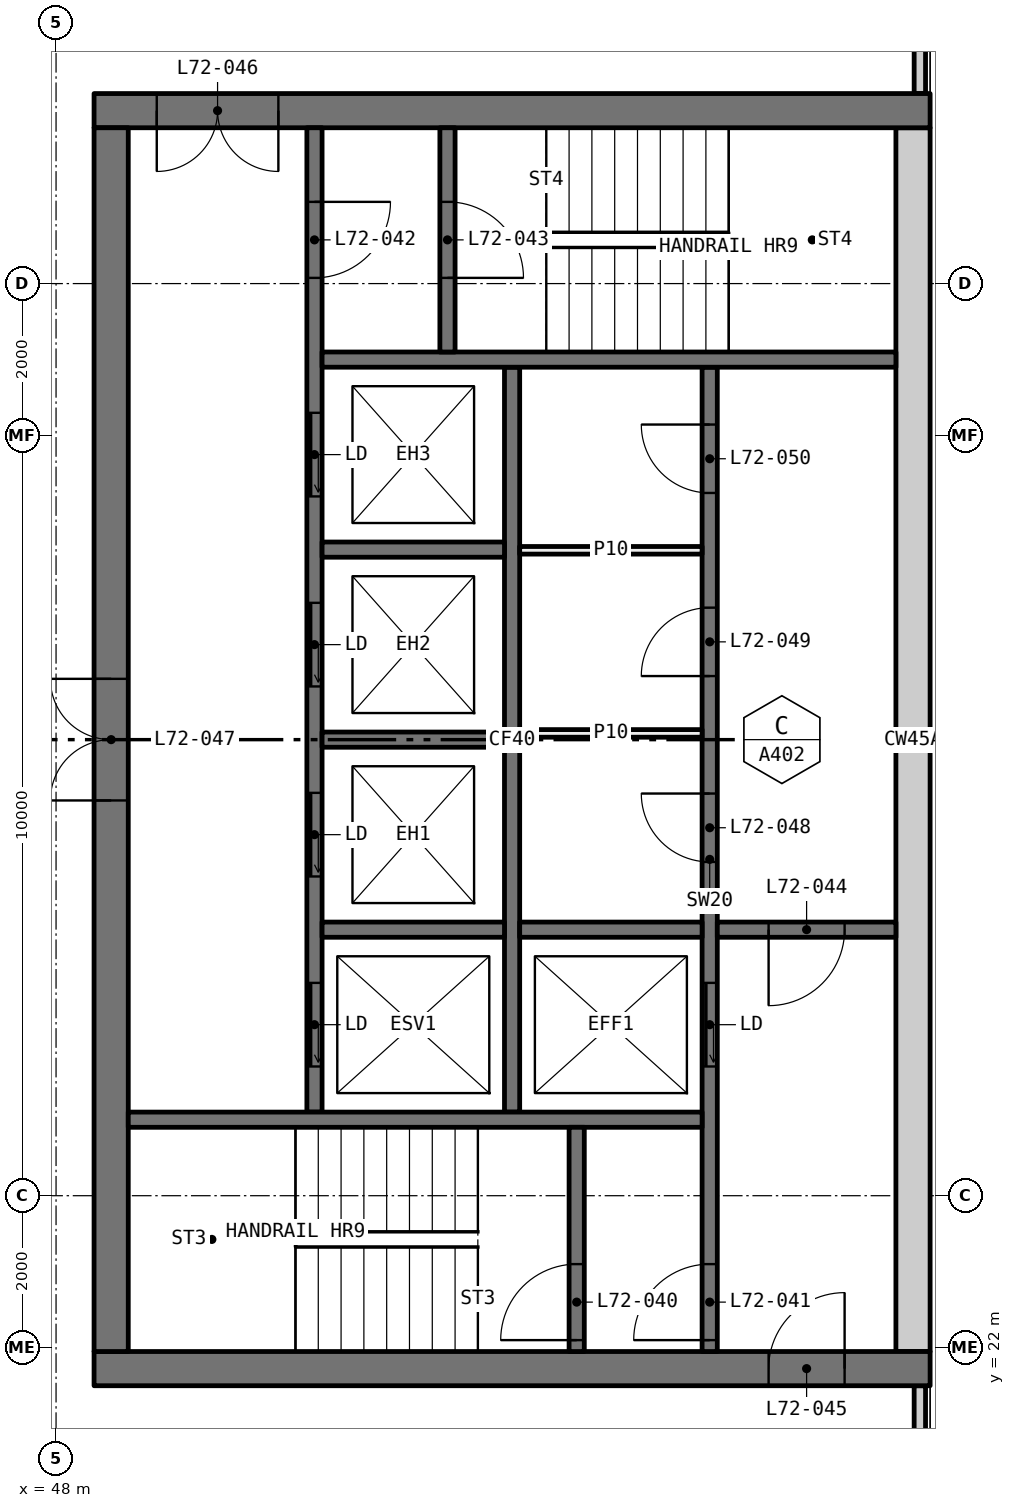
"""IFC4 building model, lengths in metres.
Left out: names, types, materials, properties, quantities, classifications, styles, units other than length and angle.
Written with IfcOpenShell. Run it as: python <this file> out.ifc"""

import sys

from ifc_helpers import new_model, si_unit, direction, frame, frame_2d, origin, place, context, subcontext, project, spatial, rectangle, extrude, element, fill, save


model = new_model("IFC4")
c1 = context("Model", 3, precision=1e-05, world=origin(), true_north=direction((0.0, 1.0)))
c2 = subcontext(c1, "Body", "Model", "MODEL_VIEW")
j1 = project(units=[si_unit("LENGTHUNIT", "METRE"), si_unit("PLANEANGLEUNIT", "RADIAN")], contexts=[c1])
p1 = place(None, origin())
s1 = spatial("IfcSite", under=j1, at=p1, CompositionType="ELEMENT")
p2 = place(p1, origin())
s2 = spatial("IfcBuilding", under=s1, at=p2, CompositionType="ELEMENT")
p3 = place(p2, frame((0.0, 0.0, 266.25)))
s3 = spatial("IfcBuildingStorey", under=s2, at=p3, CompositionType="ELEMENT", Elevation=266.25)
for number, where, z_axis, x_axis in (
    (1, (59.365, 18.71, 0.0), (0.0, 0.0, 1.0), (0.0, 1.0, 0.0)),
    (2, (59.365, 38.5, 0.0), (0.0, 0.0, 1.0), (0.0, 1.0, 0.0)),
):
    element("IfcWall", number, at=place(p3, frame(where, z_axis=z_axis, x_axis=x_axis)), inside=s3, PredefinedType="ELEMENTEDWALL", context=c2, shape_type="SweptSolid", body=[
        extrude(rectangle(XDim=2.79, YDim=0.15, at=frame_2d((1.395, 0.0))), origin(), (0.0, 0.0, 1.0), 3.05),
    ])
p4 = place(p3, frame((59.5, 21.725, 0.0), z_axis=(0.0, 0.0, 1.0), x_axis=(-1.0, 0.0, 0.0)))
e3 = element("IfcWall", 3, at=p4, inside=s3, PredefinedType="SHEAR", context=c2, shape_type="SweptSolid", body=[
    extrude(rectangle(XDim=11.0, YDim=0.45, at=frame_2d((5.5, 0.0))), origin(), (0.0, 0.0, 1.0), 3.05),
])
p5 = place(p4, frame((1.125, 0.0, 0.0)))
e4 = element("IfcOpeningElement", 4, at=p5, cuts=e3, PredefinedType="OPENING", context=c2, shape_type="SweptSolid", body=[
    extrude(rectangle(XDim=1.0, YDim=2.1, at=frame_2d((0.5, 1.05))), frame((0.0, 0.235, 0.0), z_axis=(0.0, -1.0, 0.0), x_axis=(1.0, 0.0, 0.0)), (0.0, 0.0, 1.0), 0.47),
])
p6 = place(p3, frame((59.5, 38.275, 0.0), z_axis=(0.0, 0.0, 1.0), x_axis=(-1.0, 0.0, 0.0)))
e5 = element("IfcWall", 5, at=p6, inside=s3, PredefinedType="SHEAR", context=c2, shape_type="SweptSolid", body=[
    extrude(rectangle(XDim=11.0, YDim=0.45, at=frame_2d((5.5, 0.0))), origin(), (0.0, 0.0, 1.0), 3.05),
])
p7 = place(p6, frame((8.575, 0.0, 0.0)))
e6 = element("IfcOpeningElement", 6, at=p7, cuts=e5, PredefinedType="OPENING", context=c2, shape_type="SweptSolid", body=[
    extrude(rectangle(XDim=1.6, YDim=2.1, at=frame_2d((0.8, 1.05))), frame((0.0, 0.235, 0.0), z_axis=(0.0, -1.0, 0.0), x_axis=(1.0, 0.0, 0.0)), (0.0, 0.0, 1.0), 0.47),
])
p8 = place(p3, frame((59.275, 21.95, 0.0), z_axis=(0.0, 0.0, 1.0), x_axis=(0.0, 1.0, 0.0)))
e7 = element("IfcWall", 7, at=p8, inside=s3, PredefinedType="SHEAR", context=c2, shape_type="SweptSolid", body=[
    extrude(rectangle(XDim=16.1, YDim=0.45, at=frame_2d((8.05, 0.0))), origin(), (0.0, 0.0, 1.0), 3.05),
])
p9 = place(p3, frame((48.725, 21.95, 0.0), z_axis=(0.0, 0.0, 1.0), x_axis=(0.0, 1.0, 0.0)))
e8 = element("IfcWall", 8, at=p9, inside=s3, PredefinedType="SHEAR", context=c2, shape_type="SweptSolid", body=[
    extrude(rectangle(XDim=16.1, YDim=0.45, at=frame_2d((8.05, 0.0))), origin(), (0.0, 0.0, 1.0), 3.05),
])
p10 = place(p9, frame((7.25, 0.0, 0.0)))
e9 = element("IfcOpeningElement", 9, at=p10, cuts=e8, PredefinedType="OPENING", context=c2, shape_type="SweptSolid", body=[
    extrude(rectangle(XDim=1.6, YDim=2.1, at=frame_2d((0.8, 1.05))), frame((0.0, 0.235, 0.0), z_axis=(0.0, -1.0, 0.0), x_axis=(1.0, 0.0, 0.0)), (0.0, 0.0, 1.0), 0.47),
])
p11 = place(p3, frame((56.6, 21.95, 0.0), z_axis=(0.0, 0.0, 1.0), x_axis=(0.0, 1.0, 0.0)))
e10 = element("IfcWall", 10, at=p11, inside=s3, PredefinedType="SOLIDWALL", context=c2, shape_type="SweptSolid", body=[
    extrude(rectangle(XDim=12.95, YDim=0.2, at=frame_2d((6.475, 0.0))), origin(), (0.0, 0.0, 1.0), 3.05),
])
p12 = place(p11, frame((3.75, 0.0, 0.0)))
e11 = element("IfcOpeningElement", 11, at=p12, cuts=e10, PredefinedType="OPENING", context=c2, shape_type="SweptSolid", body=[
    extrude(rectangle(XDim=1.1, YDim=2.1, at=frame_2d((0.55, 1.05))), frame((0.0, 0.11, 0.0), z_axis=(0.0, -1.0, 0.0), x_axis=(1.0, 0.0, 0.0)), (0.0, 0.0, 1.0), 0.22),
])
p13 = place(p11, frame((0.15, 0.0, 0.0)))
e12 = element("IfcOpeningElement", 12, at=p13, cuts=e10, PredefinedType="OPENING", context=c2, shape_type="SweptSolid", body=[
    extrude(rectangle(XDim=1.0, YDim=2.1, at=frame_2d((0.5, 1.05))), frame((0.0, 0.11, 0.0), z_axis=(0.0, -1.0, 0.0), x_axis=(1.0, 0.0, 0.0)), (0.0, 0.0, 1.0), 0.22),
])
p14 = place(p11, frame((6.441, 0.0, 0.0)))
e13 = element("IfcOpeningElement", 13, at=p14, cuts=e10, PredefinedType="OPENING", context=c2, shape_type="SweptSolid", body=[
    extrude(rectangle(XDim=0.9, YDim=2.1, at=frame_2d((0.45, 1.05))), frame((0.0, 0.11, 0.0), z_axis=(0.0, -1.0, 0.0), x_axis=(1.0, 0.0, 0.0)), (0.0, 0.0, 1.0), 0.22),
])
p15 = place(p11, frame((8.886, 0.0, 0.0)))
e14 = element("IfcOpeningElement", 14, at=p15, cuts=e10, PredefinedType="OPENING", context=c2, shape_type="SweptSolid", body=[
    extrude(rectangle(XDim=0.9, YDim=2.1, at=frame_2d((0.45, 1.05))), frame((0.0, 0.11, 0.0), z_axis=(0.0, -1.0, 0.0), x_axis=(1.0, 0.0, 0.0)), (0.0, 0.0, 1.0), 0.22),
])
p16 = place(p11, frame((11.295, 0.0, 0.0)))
e15 = element("IfcOpeningElement", 15, at=p16, cuts=e10, PredefinedType="OPENING", context=c2, shape_type="SweptSolid", body=[
    extrude(rectangle(XDim=0.9, YDim=2.1, at=frame_2d((0.45, 1.05))), frame((0.0, 0.11, 0.0), z_axis=(0.0, -1.0, 0.0), x_axis=(1.0, 0.0, 0.0)), (0.0, 0.0, 1.0), 0.22),
])
p17 = place(p3, frame((51.4, 25.1, 0.0), z_axis=(0.0, 0.0, 1.0), x_axis=(0.0, 1.0, 0.0)))
e16 = element("IfcWall", 16, at=p17, inside=s3, PredefinedType="SOLIDWALL", context=c2, shape_type="SweptSolid", body=[
    extrude(rectangle(XDim=12.95, YDim=0.2, at=frame_2d((6.475, 0.0))), origin(), (0.0, 0.0, 1.0), 3.05),
])
p18 = place(p17, frame((0.6, 0.0, 0.0)))
e17 = element("IfcOpeningElement", 17, at=p18, cuts=e16, PredefinedType="OPENING", context=c2, shape_type="SweptSolid", body=[
    extrude(rectangle(XDim=1.1, YDim=2.1, at=frame_2d((0.55, 1.05))), frame((0.0, 0.11, 0.0), z_axis=(0.0, -1.0, 0.0), x_axis=(1.0, 0.0, 0.0)), (0.0, 0.0, 1.0), 0.22),
])
p19 = place(p17, frame((3.1, 0.0, 0.0)))
e18 = element("IfcOpeningElement", 18, at=p19, cuts=e16, PredefinedType="OPENING", context=c2, shape_type="SweptSolid", body=[
    extrude(rectangle(XDim=1.1, YDim=2.1, at=frame_2d((0.55, 1.05))), frame((0.0, 0.11, 0.0), z_axis=(0.0, -1.0, 0.0), x_axis=(1.0, 0.0, 0.0)), (0.0, 0.0, 1.0), 0.22),
])
p20 = place(p17, frame((5.6, 0.0, 0.0)))
e19 = element("IfcOpeningElement", 19, at=p20, cuts=e16, PredefinedType="OPENING", context=c2, shape_type="SweptSolid", body=[
    extrude(rectangle(XDim=1.1, YDim=2.1, at=frame_2d((0.55, 1.05))), frame((0.0, 0.11, 0.0), z_axis=(0.0, -1.0, 0.0), x_axis=(1.0, 0.0, 0.0)), (0.0, 0.0, 1.0), 0.22),
])
p21 = place(p17, frame((8.1, 0.0, 0.0)))
e20 = element("IfcOpeningElement", 20, at=p21, cuts=e16, PredefinedType="OPENING", context=c2, shape_type="SweptSolid", body=[
    extrude(rectangle(XDim=1.1, YDim=2.1, at=frame_2d((0.55, 1.05))), frame((0.0, 0.11, 0.0), z_axis=(0.0, -1.0, 0.0), x_axis=(1.0, 0.0, 0.0)), (0.0, 0.0, 1.0), 0.22),
])
p22 = place(p17, frame((10.975, 0.0, 0.0)))
e21 = element("IfcOpeningElement", 21, at=p22, cuts=e16, PredefinedType="OPENING", context=c2, shape_type="SweptSolid", body=[
    extrude(rectangle(XDim=1.0, YDim=2.1, at=frame_2d((0.5, 1.05))), frame((0.0, 0.11, 0.0), z_axis=(0.0, -1.0, 0.0), x_axis=(1.0, 0.0, 0.0)), (0.0, 0.0, 1.0), 0.22),
])
p23 = place(p3, frame((54.0, 25.1, 0.0), z_axis=(0.0, 0.0, 1.0), x_axis=(0.0, 1.0, 0.0)))
e22 = element("IfcWall", 22, at=p23, inside=s3, PredefinedType="SOLIDWALL", context=c2, shape_type="SweptSolid", body=[
    extrude(rectangle(XDim=9.8, YDim=0.2, at=frame_2d((4.9, 0.0))), origin(), (0.0, 0.0, 1.0), 3.05),
])
for number, where, z_axis, x_axis in (
    (23, (56.5, 25.0, 0.0), (0.0, 0.0, 1.0), (-1.0, 0.0, 0.0)),
    (24, (59.05, 35.0, 0.0), (0.0, 0.0, 1.0), (-1.0, 0.0, 0.0)),
):
    element("IfcWall", number, at=place(p3, frame(where, z_axis=z_axis, x_axis=x_axis)), inside=s3, PredefinedType="SOLIDWALL", context=c2, shape_type="SweptSolid", body=[
        extrude(rectangle(XDim=7.55, YDim=0.2, at=frame_2d((3.775, 0.0))), origin(), (0.0, 0.0, 1.0), 3.05),
    ])
p24 = place(p3, frame((59.05, 27.5, 0.0), z_axis=(0.0, 0.0, 1.0), x_axis=(-1.0, 0.0, 0.0)))
e25 = element("IfcWall", 25, at=p24, inside=s3, PredefinedType="SOLIDWALL", context=c2, shape_type="SweptSolid", body=[
    extrude(rectangle(XDim=2.35, YDim=0.2, at=frame_2d((1.175, 0.0))), origin(), (0.0, 0.0, 1.0), 3.05),
])
p25 = place(p24, frame((0.675, 0.0, 0.0)))
e26 = element("IfcOpeningElement", 26, at=p25, cuts=e25, PredefinedType="OPENING", context=c2, shape_type="SweptSolid", body=[
    extrude(rectangle(XDim=1.0, YDim=2.1, at=frame_2d((0.5, 1.05))), frame((0.0, 0.11, 0.0), z_axis=(0.0, -1.0, 0.0), x_axis=(1.0, 0.0, 0.0)), (0.0, 0.0, 1.0), 0.22),
])
p26 = place(p3, frame((54.85, 21.95, 0.0), z_axis=(0.0, 0.0, 1.0), x_axis=(0.0, 1.0, 0.0)))
e27 = element("IfcWall", 27, at=p26, inside=s3, PredefinedType="SOLIDWALL", context=c2, shape_type="SweptSolid", body=[
    extrude(rectangle(XDim=2.95, YDim=0.2, at=frame_2d((1.475, 0.0))), origin(), (0.0, 0.0, 1.0), 3.05),
])
p27 = place(p26, frame((0.15, 0.0, 0.0)))
e28 = element("IfcOpeningElement", 28, at=p27, cuts=e27, PredefinedType="OPENING", context=c2, shape_type="SweptSolid", body=[
    extrude(rectangle(XDim=1.0, YDim=2.1, at=frame_2d((0.5, 1.05))), frame((0.0, 0.11, 0.0), z_axis=(0.0, -1.0, 0.0), x_axis=(1.0, 0.0, 0.0)), (0.0, 0.0, 1.0), 0.22),
])
p28 = place(p3, frame((53.15, 35.1, 0.0), z_axis=(0.0, 0.0, 1.0), x_axis=(0.0, 1.0, 0.0)))
e29 = element("IfcWall", 29, at=p28, inside=s3, PredefinedType="SOLIDWALL", context=c2, shape_type="SweptSolid", body=[
    extrude(rectangle(XDim=2.95, YDim=0.2, at=frame_2d((1.475, 0.0))), origin(), (0.0, 0.0, 1.0), 3.05),
])
p29 = place(p28, frame((0.975, 0.0, 0.0)))
e30 = element("IfcOpeningElement", 30, at=p29, cuts=e29, PredefinedType="OPENING", context=c2, shape_type="SweptSolid", body=[
    extrude(rectangle(XDim=1.0, YDim=2.1, at=frame_2d((0.5, 1.05))), frame((0.0, 0.11, 0.0), z_axis=(0.0, -1.0, 0.0), x_axis=(1.0, 0.0, 0.0)), (0.0, 0.0, 1.0), 0.22),
])
for number, where, z_axis, x_axis in (
    (31, (56.5, 27.5, 0.0), (0.0, 0.0, 1.0), (-1.0, 0.0, 0.0)),
    (32, (53.9, 27.5, 0.0), (0.0, 0.0, 1.0), (-1.0, 0.0, 0.0)),
    (33, (53.9, 30.0, 0.0), (0.0, 0.0, 1.0), (-1.0, 0.0, 0.0)),
    (34, (53.9, 32.5, 0.0), (0.0, 0.0, 1.0), (-1.0, 0.0, 0.0)),
):
    element("IfcWall", number, at=place(p3, frame(where, z_axis=z_axis, x_axis=x_axis)), inside=s3, PredefinedType="SOLIDWALL", context=c2, shape_type="SweptSolid", body=[
        extrude(rectangle(XDim=2.4, YDim=0.2, at=frame_2d((1.2, 0.0))), origin(), (0.0, 0.0, 1.0), 3.05),
    ])
for number, where, z_axis, x_axis in (
    (35, (56.5, 30.082, 0.0), (0.0, 0.0, 1.0), (-1.0, 0.0, 0.0)),
    (36, (56.5, 32.491, 0.0), (0.0, 0.0, 1.0), (-1.0, 0.0, 0.0)),
):
    element("IfcWall", number, at=place(p3, frame(where, z_axis=z_axis, x_axis=x_axis)), inside=s3, PredefinedType="PARTITIONING", context=c2, shape_type="SweptSolid", body=[
        extrude(rectangle(XDim=2.4, YDim=0.1, at=frame_2d((1.2, 0.0))), origin(), (0.0, 0.0, 1.0), 3.05),
    ])
p30 = place(p18, origin())
e37 = element("IfcDoor", 37, at=p30, inside=s3, OperationType="SLIDING_TO_LEFT", PredefinedType="DOOR", context=c2, shape_type="SweptSolid", body=[
    extrude(rectangle(XDim=1.1, YDim=2.1, at=frame_2d((0.55, 1.05))), frame((0.0, 0.025, 0.0), z_axis=(0.0, -1.0, 0.0), x_axis=(1.0, 0.0, 0.0)), (0.0, 0.0, 1.0), 0.05),
])
fill(e17, e37)
p31 = place(p19, origin())
e38 = element("IfcDoor", 38, at=p31, inside=s3, OperationType="SLIDING_TO_LEFT", PredefinedType="DOOR", context=c2, shape_type="SweptSolid", body=[
    extrude(rectangle(XDim=1.1, YDim=2.1, at=frame_2d((0.55, 1.05))), frame((0.0, 0.025, 0.0), z_axis=(0.0, -1.0, 0.0), x_axis=(1.0, 0.0, 0.0)), (0.0, 0.0, 1.0), 0.05),
])
fill(e18, e38)
p32 = place(p20, origin())
e39 = element("IfcDoor", 39, at=p32, inside=s3, OperationType="SLIDING_TO_LEFT", PredefinedType="DOOR", context=c2, shape_type="SweptSolid", body=[
    extrude(rectangle(XDim=1.1, YDim=2.1, at=frame_2d((0.55, 1.05))), frame((0.0, 0.025, 0.0), z_axis=(0.0, -1.0, 0.0), x_axis=(1.0, 0.0, 0.0)), (0.0, 0.0, 1.0), 0.05),
])
fill(e19, e39)
p33 = place(p21, origin())
e40 = element("IfcDoor", 40, at=p33, inside=s3, OperationType="SLIDING_TO_LEFT", PredefinedType="DOOR", context=c2, shape_type="SweptSolid", body=[
    extrude(rectangle(XDim=1.1, YDim=2.1, at=frame_2d((0.55, 1.05))), frame((0.0, 0.025, 0.0), z_axis=(0.0, -1.0, 0.0), x_axis=(1.0, 0.0, 0.0)), (0.0, 0.0, 1.0), 0.05),
])
fill(e20, e40)
p34 = place(p12, origin())
e41 = element("IfcDoor", 41, at=p34, inside=s3, OperationType="SLIDING_TO_LEFT", PredefinedType="DOOR", context=c2, shape_type="SweptSolid", body=[
    extrude(rectangle(XDim=1.1, YDim=2.1, at=frame_2d((0.55, 1.05))), frame((0.0, 0.025, 0.0), z_axis=(0.0, -1.0, 0.0), x_axis=(1.0, 0.0, 0.0)), (0.0, 0.0, 1.0), 0.05),
])
fill(e11, e41)
p35 = place(p27, origin())
e42 = element("IfcDoor", 42, at=p35, inside=s3, OperationType="SINGLE_SWING_RIGHT", PredefinedType="DOOR", context=c2, shape_type="SweptSolid", body=[
    extrude(rectangle(XDim=1.0, YDim=2.1, at=frame_2d((0.5, 1.05))), frame((0.0, 0.025, 0.0), z_axis=(0.0, -1.0, 0.0), x_axis=(1.0, 0.0, 0.0)), (0.0, 0.0, 1.0), 0.05),
])
fill(e28, e42)
p36 = place(p13, origin())
e43 = element("IfcDoor", 43, at=p36, inside=s3, OperationType="SINGLE_SWING_RIGHT", PredefinedType="DOOR", context=c2, shape_type="SweptSolid", body=[
    extrude(rectangle(XDim=1.0, YDim=2.1, at=frame_2d((0.5, 1.05))), frame((0.0, 0.025, 0.0), z_axis=(0.0, -1.0, 0.0), x_axis=(1.0, 0.0, 0.0)), (0.0, 0.0, 1.0), 0.05),
])
fill(e12, e43)
p37 = place(p22, frame((1.0, 0.0, 0.0), x_axis=(-1.0, 0.0, 0.0)))
e44 = element("IfcDoor", 44, at=p37, inside=s3, OperationType="SINGLE_SWING_RIGHT", PredefinedType="DOOR", context=c2, shape_type="SweptSolid", body=[
    extrude(rectangle(XDim=1.0, YDim=2.1, at=frame_2d((0.5, 1.05))), frame((0.0, 0.025, 0.0), z_axis=(0.0, -1.0, 0.0), x_axis=(1.0, 0.0, 0.0)), (0.0, 0.0, 1.0), 0.05),
])
fill(e21, e44)
p38 = place(p29, frame((1.0, 0.0, 0.0), x_axis=(-1.0, 0.0, 0.0)))
e45 = element("IfcDoor", 45, at=p38, inside=s3, OperationType="SINGLE_SWING_LEFT", PredefinedType="DOOR", context=c2, shape_type="SweptSolid", body=[
    extrude(rectangle(XDim=1.0, YDim=2.1, at=frame_2d((0.5, 1.05))), frame((0.0, 0.025, 0.0), z_axis=(0.0, -1.0, 0.0), x_axis=(1.0, 0.0, 0.0)), (0.0, 0.0, 1.0), 0.05),
])
fill(e30, e45)
p39 = place(p25, origin())
e46 = element("IfcDoor", 46, at=p39, inside=s3, OperationType="SINGLE_SWING_LEFT", PredefinedType="DOOR", context=c2, shape_type="SweptSolid", body=[
    extrude(rectangle(XDim=1.0, YDim=2.1, at=frame_2d((0.5, 1.05))), frame((0.0, 0.025, 0.0), z_axis=(0.0, -1.0, 0.0), x_axis=(1.0, 0.0, 0.0)), (0.0, 0.0, 1.0), 0.05),
])
fill(e26, e46)
p40 = place(p5, frame((1.0, 0.0, 0.0), x_axis=(-1.0, 0.0, 0.0)))
e47 = element("IfcDoor", 47, at=p40, inside=s3, OperationType="SINGLE_SWING_LEFT", PredefinedType="DOOR", context=c2, shape_type="SweptSolid", body=[
    extrude(rectangle(XDim=1.0, YDim=2.1, at=frame_2d((0.5, 1.05))), frame((0.0, 0.025, 0.0), z_axis=(0.0, -1.0, 0.0), x_axis=(1.0, 0.0, 0.0)), (0.0, 0.0, 1.0), 0.05),
])
fill(e4, e47)
p41 = place(p7, origin())
e48 = element("IfcDoor", 48, at=p41, inside=s3, OperationType="DOUBLE_DOOR_SINGLE_SWING", PredefinedType="DOOR", context=c2, shape_type="SweptSolid", body=[
    extrude(rectangle(XDim=1.6, YDim=2.1, at=frame_2d((0.8, 1.05))), frame((0.0, 0.025, 0.0), z_axis=(0.0, -1.0, 0.0), x_axis=(1.0, 0.0, 0.0)), (0.0, 0.0, 1.0), 0.05),
])
fill(e6, e48)
p42 = place(p10, origin())
e49 = element("IfcDoor", 49, at=p42, inside=s3, OperationType="DOUBLE_DOOR_SINGLE_SWING", PredefinedType="DOOR", context=c2, shape_type="SweptSolid", body=[
    extrude(rectangle(XDim=1.6, YDim=2.1, at=frame_2d((0.8, 1.05))), frame((0.0, 0.025, 0.0), z_axis=(0.0, -1.0, 0.0), x_axis=(1.0, 0.0, 0.0)), (0.0, 0.0, 1.0), 0.05),
])
fill(e9, e49)
p43 = place(p14, origin())
e50 = element("IfcDoor", 50, at=p43, inside=s3, OperationType="SINGLE_SWING_LEFT", PredefinedType="DOOR", context=c2, shape_type="SweptSolid", body=[
    extrude(rectangle(XDim=0.9, YDim=2.1, at=frame_2d((0.45, 1.05))), frame((0.0, 0.025, 0.0), z_axis=(0.0, -1.0, 0.0), x_axis=(1.0, 0.0, 0.0)), (0.0, 0.0, 1.0), 0.05),
])
fill(e13, e50)
p44 = place(p15, origin())
e51 = element("IfcDoor", 51, at=p44, inside=s3, OperationType="SINGLE_SWING_RIGHT", PredefinedType="DOOR", context=c2, shape_type="SweptSolid", body=[
    extrude(rectangle(XDim=0.9, YDim=2.1, at=frame_2d((0.45, 1.05))), frame((0.0, 0.025, 0.0), z_axis=(0.0, -1.0, 0.0), x_axis=(1.0, 0.0, 0.0)), (0.0, 0.0, 1.0), 0.05),
])
fill(e14, e51)
p45 = place(p16, origin())
e52 = element("IfcDoor", 52, at=p45, inside=s3, OperationType="SINGLE_SWING_LEFT", PredefinedType="DOOR", context=c2, shape_type="SweptSolid", body=[
    extrude(rectangle(XDim=0.9, YDim=2.1, at=frame_2d((0.45, 1.05))), frame((0.0, 0.025, 0.0), z_axis=(0.0, -1.0, 0.0), x_axis=(1.0, 0.0, 0.0)), (0.0, 0.0, 1.0), 0.05),
])
fill(e15, e52)
save(model, sys.argv[1])
